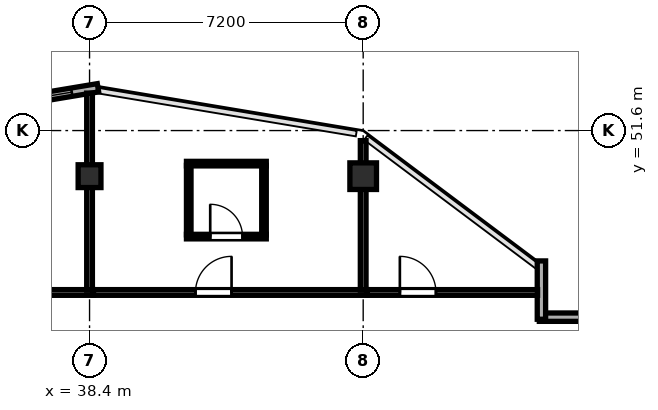
"""IFC4 building model, lengths in metres.
Left out: names, types, materials, properties, quantities, classifications, styles, units other than length and angle.
Written with IfcOpenShell. Run it as: python <this file> out.ifc"""

import sys

from ifc_helpers import new_model, si_unit, direction, frame, frame_2d, origin, origin_2d, place, context, subcontext, project, spatial, rectangle, hollow_rectangle, extrude, element, fill, save


model = new_model("IFC4")
c1 = context("Model", 3, precision=1e-05, world=origin(), true_north=direction((0.0, 1.0)))
c2 = subcontext(c1, "Body", "Model", "MODEL_VIEW")
j1 = project(units=[si_unit("LENGTHUNIT", "METRE"), si_unit("PLANEANGLEUNIT", "RADIAN")], contexts=[c1])
p1 = place(None, origin())
s1 = spatial("IfcSite", under=j1, at=p1, CompositionType="ELEMENT")
p2 = place(p1, origin())
s2 = spatial("IfcBuilding", under=s1, at=p2, CompositionType="ELEMENT")
p3 = place(p2, frame((0.0, 0.0, 286.1)))
s3 = spatial("IfcBuildingStorey", under=s2, at=p3, CompositionType="ELEMENT", Elevation=286.1)
p4 = place(p3, frame((45.6, 50.4, 0.0), z_axis=(0.0, 0.0, 1.0), x_axis=(1.0, 0.0, 0.0)))
e1 = element("IfcColumn", 1, at=p4, inside=s3, PredefinedType="COLUMN", context=c2, shape_type="SweptSolid", body=[
    extrude(hollow_rectangle(XDim=0.7, YDim=0.7, WallThickness=0.026, at=origin_2d()), origin(), (0.0, 0.0, 1.0), 3.9),
])
p5 = place(p3, frame((38.4, 50.4, 0.0), z_axis=(0.0, 0.0, 1.0), x_axis=(1.0, 0.0, 0.0)))
e2 = element("IfcColumn", 2, at=p5, inside=s3, PredefinedType="COLUMN", context=c2, shape_type="SweptSolid", body=[
    extrude(hollow_rectangle(XDim=0.6, YDim=0.6, WallThickness=0.024, at=origin_2d()), origin(), (0.0, 0.0, 1.0), 3.9),
])
p6 = place(p3, frame((51.545, 46.69, 0.0), z_axis=(0.0, 0.0, 1.0), x_axis=(-1.0, 0.0, 0.0)))
e3 = element("IfcWall", 3, at=p6, inside=s3, PredefinedType="SOLIDWALL", context=c2, shape_type="SweptSolid", body=[
    extrude(rectangle(XDim=1.31, YDim=0.22, at=frame_2d((0.655, 0.0))), origin(), (0.0, 0.0, 1.0), 3.72),
])
p7 = place(p3, frame((50.29, 46.635, 0.0), z_axis=(0.0, 0.0, 1.0), x_axis=(0.0, 1.0, 0.0)))
e4 = element("IfcWall", 4, at=p7, inside=s3, PredefinedType="SOLIDWALL", context=c2, shape_type="SweptSolid", body=[
    extrude(rectangle(XDim=1.535, YDim=0.22, at=frame_2d((0.768, 0.0))), origin(), (0.0, 0.0, 1.0), 3.72),
])
p8 = place(p3, frame((38.622, 52.726, 0.0), z_axis=(0.0, 0.0, 1.0), x_axis=(-0.986390420428, -0.164420006349, 0.0)))
e5 = element("IfcWall", 5, at=p8, inside=s3, PredefinedType="SOLIDWALL", context=c2, shape_type="SweptSolid", body=[
    extrude(rectangle(XDim=7.534, YDim=0.22, at=frame_2d((3.767, 0.0))), origin(), (0.0, 0.0, 1.0), 3.72),
])
p9 = place(p8, frame((0.7, 0.0, 0.85)))
e6 = element("IfcOpeningElement", 6, at=p9, cuts=e5, PredefinedType="OPENING", context=c2, shape_type="SweptSolid", body=[
    extrude(rectangle(XDim=1.25, YDim=1.95, at=frame_2d((0.625, 0.975))), frame((0.0, 0.12, 0.0), z_axis=(0.0, -1.0, 0.0), x_axis=(1.0, 0.0, 0.0)), (0.0, 0.0, 1.0), 0.24),
])
p10 = place(p3, frame((31.282, 47.34, 0.0), z_axis=(0.0, 0.0, 1.0), x_axis=(1.0, 0.0, 0.0)))
e7 = element("IfcWall", 7, at=p10, inside=s3, PredefinedType="PARTITIONING", context=c2, shape_type="SweptSolid", body=[
    extrude(rectangle(XDim=7.218, YDim=0.15, at=frame_2d((3.609, 0.0))), origin(), (0.0, 0.0, 1.0), 3.72),
])
p11 = place(p10, frame((2.93, 0.0, 0.0)))
e8 = element("IfcOpeningElement", 8, at=p11, cuts=e7, PredefinedType="OPENING", context=c2, shape_type="SweptSolid", body=[
    extrude(rectangle(XDim=0.95, YDim=2.15, at=frame_2d((0.475, 1.075))), frame((0.0, 0.085, 0.0), z_axis=(0.0, -1.0, 0.0), x_axis=(1.0, 0.0, 0.0)), (0.0, 0.0, 1.0), 0.17),
])
p12 = place(p3, frame((38.4, 47.4, 0.0), z_axis=(0.0, 0.0, 1.0), x_axis=(0.0, 1.0, 0.0)))
e9 = element("IfcWall", 9, at=p12, inside=s3, PredefinedType="PARTITIONING", context=c2, shape_type="SweptSolid", body=[
    extrude(rectangle(XDim=5.185, YDim=0.15, at=frame_2d((2.593, 0.0))), origin(), (0.0, 0.0, 1.0), 3.72),
])
p13 = place(p3, frame((38.502, 47.34, 0.0), z_axis=(0.0, 0.0, 1.0), x_axis=(1.0, 0.0, 0.0)))
e10 = element("IfcWall", 10, at=p13, inside=s3, PredefinedType="PARTITIONING", context=c2, shape_type="SweptSolid", body=[
    extrude(rectangle(XDim=7.198, YDim=0.15, at=frame_2d((3.599, 0.0))), origin(), (0.0, 0.0, 1.0), 3.72),
])
p14 = place(p13, frame((2.685, 0.0, 0.0)))
e11 = element("IfcOpeningElement", 11, at=p14, cuts=e10, PredefinedType="OPENING", context=c2, shape_type="SweptSolid", body=[
    extrude(rectangle(XDim=0.95, YDim=2.15, at=frame_2d((0.475, 1.075))), frame((0.0, 0.085, 0.0), z_axis=(0.0, -1.0, 0.0), x_axis=(1.0, 0.0, 0.0)), (0.0, 0.0, 1.0), 0.17),
])
p15 = place(p3, frame((45.6, 47.4, 0.0), z_axis=(0.0, 0.0, 1.0), x_axis=(0.0, 1.0, 0.0)))
e12 = element("IfcWall", 12, at=p15, inside=s3, PredefinedType="PARTITIONING", context=c2, shape_type="SweptSolid", body=[
    extrude(rectangle(XDim=3.935, YDim=0.15, at=frame_2d((1.968, 0.0))), origin(), (0.0, 0.0, 1.0), 3.255),
])
p16 = place(p3, frame((40.95, 50.73, 0.0), z_axis=(0.0, 0.0, 1.0), x_axis=(1.0, 0.0, 0.0)))
e13 = element("IfcWall", 13, at=p16, inside=s3, PredefinedType="PARTITIONING", context=c2, shape_type="SweptSolid", body=[
    extrude(rectangle(XDim=2.1, YDim=0.12, at=frame_2d((1.05, 0.0))), origin(), (0.0, 0.0, 1.0), 3.72),
])
p17 = place(p3, frame((40.95, 48.81, 0.0), z_axis=(0.0, 0.0, 1.0), x_axis=(1.0, 0.0, 0.0)))
e14 = element("IfcWall", 14, at=p17, inside=s3, PredefinedType="PARTITIONING", context=c2, shape_type="SweptSolid", body=[
    extrude(rectangle(XDim=2.1, YDim=0.12, at=frame_2d((1.05, 0.0))), origin(), (0.0, 0.0, 1.0), 3.72),
])
p18 = place(p17, frame((0.625, 0.0, 0.0)))
e15 = element("IfcOpeningElement", 15, at=p18, cuts=e14, PredefinedType="OPENING", context=c2, shape_type="SweptSolid", body=[
    extrude(rectangle(XDim=0.85, YDim=2.1, at=frame_2d((0.425, 1.05))), frame((0.0, 0.07, 0.0), z_axis=(0.0, -1.0, 0.0), x_axis=(1.0, 0.0, 0.0)), (0.0, 0.0, 1.0), 0.14),
])
for number, where, z_axis, x_axis in (
    (16, (41.01, 48.855, 0.0), (0.0, 0.0, 1.0), (0.0, 1.0, 0.0)),
    (17, (42.99, 48.855, 0.0), (0.0, 0.0, 1.0), (0.0, 1.0, 0.0)),
):
    element("IfcWall", number, at=place(p3, frame(where, z_axis=z_axis, x_axis=x_axis)), inside=s3, PredefinedType="PARTITIONING", context=c2, shape_type="SweptSolid", body=[
        extrude(rectangle(XDim=1.83, YDim=0.12, at=frame_2d((0.915, 0.0))), origin(), (0.0, 0.0, 1.0), 3.72),
    ])
p19 = place(p3, frame((45.702, 47.34, 0.0), z_axis=(0.0, 0.0, 1.0), x_axis=(1.0, 0.0, 0.0)))
e18 = element("IfcWall", 18, at=p19, inside=s3, PredefinedType="PARTITIONING", context=c2, shape_type="SweptSolid", body=[
    extrude(rectangle(XDim=4.486, YDim=0.15, at=frame_2d((2.243, 0.0))), origin(), (0.0, 0.0, 1.0), 3.72),
])
p20 = place(p19, frame((0.863, 0.0, 0.0)))
e19 = element("IfcOpeningElement", 19, at=p20, cuts=e18, PredefinedType="OPENING", context=c2, shape_type="SweptSolid", body=[
    extrude(rectangle(XDim=0.95, YDim=2.12, at=frame_2d((0.475, 1.06))), frame((0.0, 0.085, 0.0), z_axis=(0.0, -1.0, 0.0), x_axis=(1.0, 0.0, 0.0)), (0.0, 0.0, 1.0), 0.17),
])
p21 = place(p9, origin())
e20 = element("IfcWindow", 20, at=p21, inside=s3, PartitioningType="SINGLE_PANEL", PredefinedType="WINDOW", context=c2, shape_type="SweptSolid", body=[
    extrude(rectangle(XDim=1.25, YDim=1.95, at=frame_2d((0.625, 0.975))), frame((0.0, 0.03, 0.0), z_axis=(0.0, -1.0, 0.0), x_axis=(1.0, 0.0, 0.0)), (0.0, 0.0, 1.0), 0.06),
])
fill(e6, e20)
p22 = place(p14, origin())
e21 = element("IfcDoor", 21, at=p22, inside=s3, OperationType="SINGLE_SWING_RIGHT", PredefinedType="DOOR", context=c2, shape_type="SweptSolid", body=[
    extrude(rectangle(XDim=0.95, YDim=2.15, at=frame_2d((0.475, 1.075))), frame((0.0, 0.025, 0.0), z_axis=(0.0, -1.0, 0.0), x_axis=(1.0, 0.0, 0.0)), (0.0, 0.0, 1.0), 0.05),
])
fill(e11, e21)
p23 = place(p18, origin())
e22 = element("IfcDoor", 22, at=p23, inside=s3, OperationType="SINGLE_SWING_LEFT", PredefinedType="DOOR", context=c2, shape_type="SweptSolid", body=[
    extrude(rectangle(XDim=0.85, YDim=2.1, at=frame_2d((0.425, 1.05))), frame((0.0, 0.025, 0.0), z_axis=(0.0, -1.0, 0.0), x_axis=(1.0, 0.0, 0.0)), (0.0, 0.0, 1.0), 0.05),
])
fill(e15, e22)
p24 = place(p20, origin())
e23 = element("IfcDoor", 23, at=p24, inside=s3, OperationType="SINGLE_SWING_LEFT", PredefinedType="DOOR", context=c2, shape_type="SweptSolid", body=[
    extrude(rectangle(XDim=0.95, YDim=2.12, at=frame_2d((0.475, 1.06))), frame((0.0, 0.025, 0.0), z_axis=(0.0, -1.0, 0.0), x_axis=(1.0, 0.0, 0.0)), (0.0, 0.0, 1.0), 0.05),
])
fill(e19, e23)
save(model, sys.argv[1])
